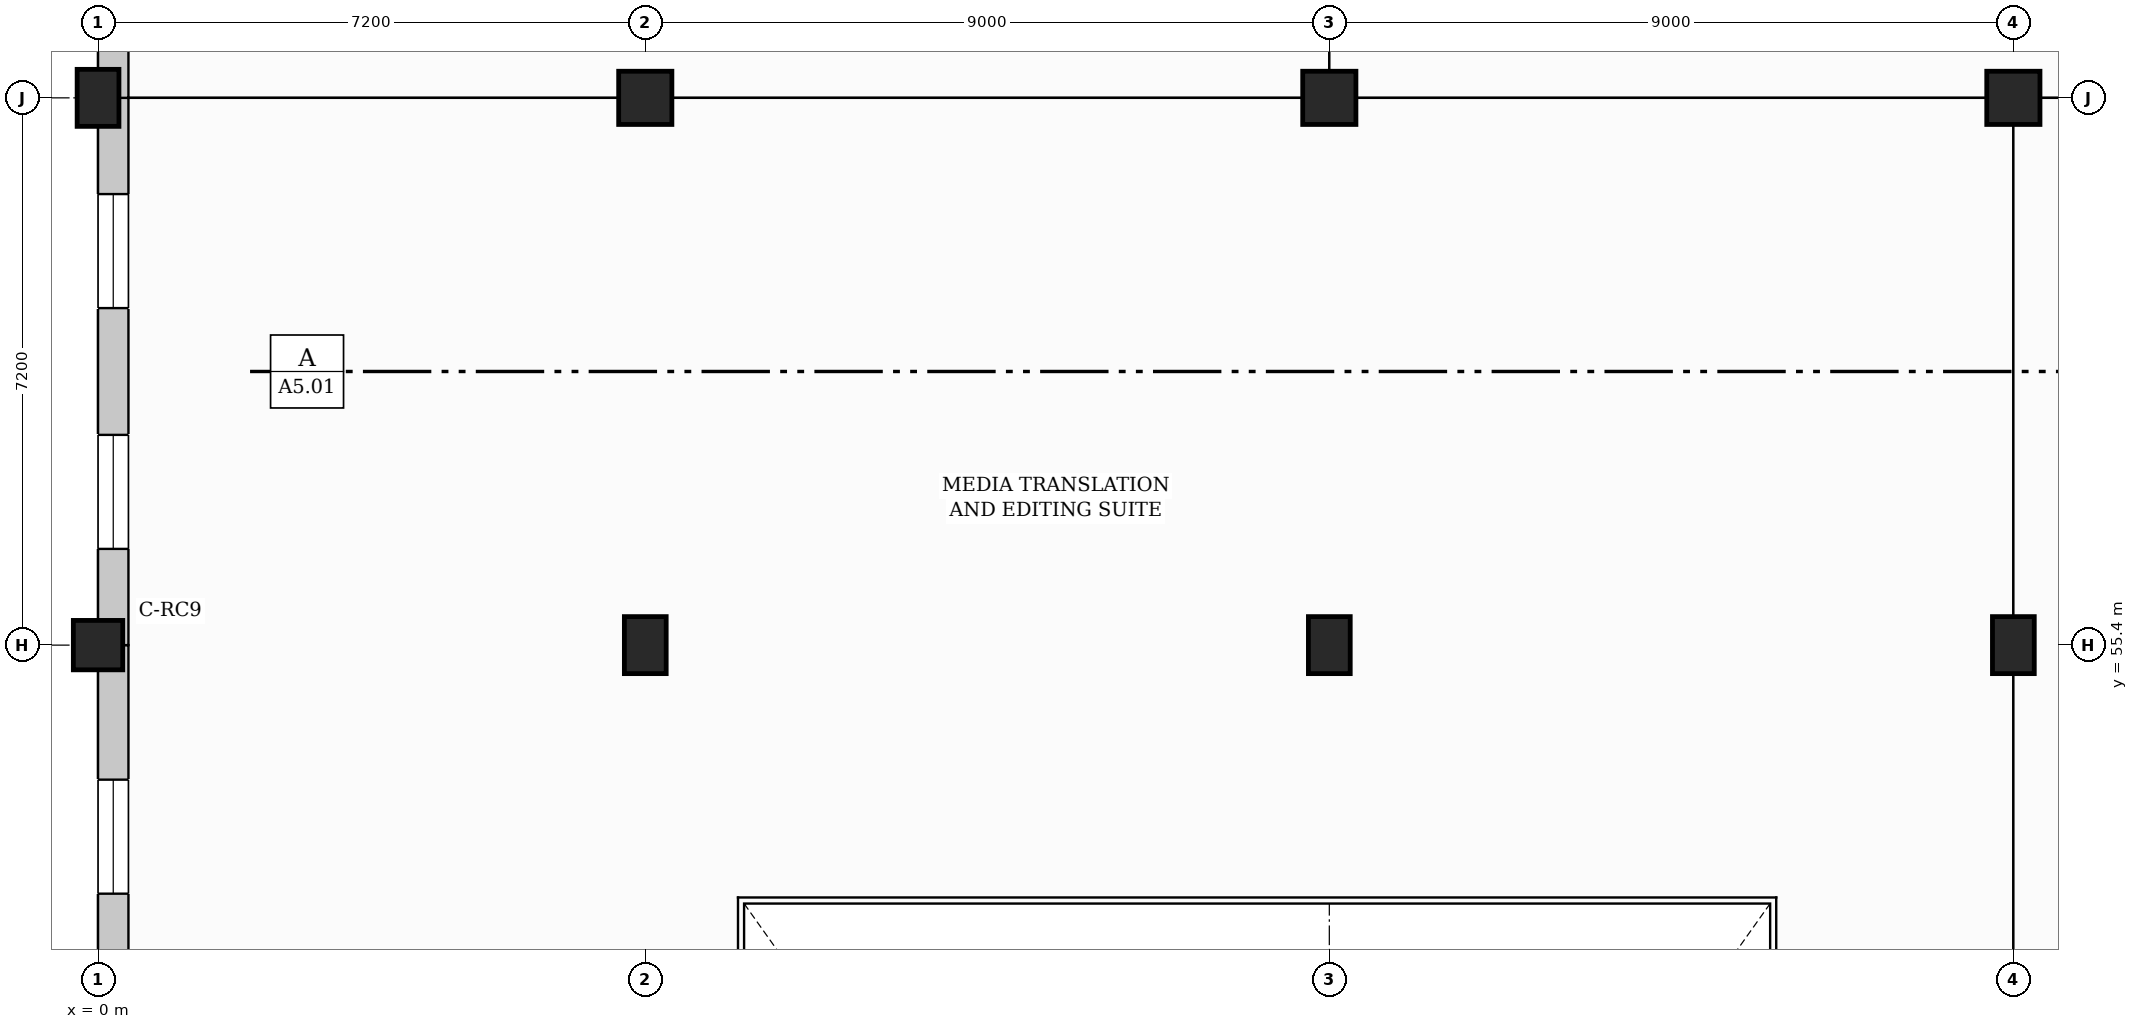
"""IFC4 building model, lengths in metres.
Left out: names, types, materials, properties, quantities, classifications, styles, units other than length and angle.
Written with IfcOpenShell. Run it as: python <this file> out.ifc"""

import sys

from ifc_helpers import new_model, si_unit, direction, frame, frame_2d, origin, origin_2d, place, context, subcontext, project, spatial, rectangle, extrude, element, fill, save


model = new_model("IFC4")
c1 = context("Model", 3, precision=1e-05, world=origin(), true_north=direction((0.0, 1.0)))
c2 = subcontext(c1, "Body", "Model", "MODEL_VIEW")
j1 = project(units=[si_unit("LENGTHUNIT", "METRE"), si_unit("PLANEANGLEUNIT", "RADIAN")], contexts=[c1])
p1 = place(None, origin())
s1 = spatial("IfcSite", under=j1, at=p1, CompositionType="ELEMENT")
p2 = place(p1, origin())
s2 = spatial("IfcBuilding", under=s1, at=p2, CompositionType="ELEMENT")
p3 = place(p2, frame((0.0, 0.0, 5.1)))
s3 = spatial("IfcBuildingStorey", under=s2, at=p3, CompositionType="ELEMENT", Elevation=5.1)
p4 = place(p3, frame((0.0, 55.4, 0.0), z_axis=(0.0, 0.0, 1.0), x_axis=(1.0, 0.0, 0.0)))
e1 = element("IfcColumn", 1, at=p4, inside=s3, PredefinedType="COLUMN", context=c2, shape_type="SweptSolid", body=[
    extrude(rectangle(XDim=0.65, YDim=0.65, at=origin_2d()), origin(), (0.0, 0.0, 1.0), 4.5),
])
for number, where, z_axis, x_axis in (
    (2, (0.0, 62.6, 0.0), (0.0, 0.0, 1.0), (1.0, 0.0, 0.0)),
    (3, (7.2, 55.4, 0.0), (0.0, 0.0, 1.0), (1.0, 0.0, 0.0)),
):
    element("IfcColumn", number, at=place(p3, frame(where, z_axis=z_axis, x_axis=x_axis)), inside=s3, PredefinedType="COLUMN", context=c2, shape_type="SweptSolid", body=[
        extrude(rectangle(XDim=0.55, YDim=0.75, at=origin_2d()), origin(), (0.0, 0.0, 1.0), 4.5),
    ])
p5 = place(p3, frame((7.2, 62.6, 0.0), z_axis=(0.0, 0.0, 1.0), x_axis=(1.0, 0.0, 0.0)))
e4 = element("IfcColumn", 4, at=p5, inside=s3, PredefinedType="COLUMN", context=c2, shape_type="SweptSolid", body=[
    extrude(rectangle(XDim=0.7, YDim=0.7, at=origin_2d()), origin(), (0.0, 0.0, 1.0), 4.5),
])
p6 = place(p3, frame((16.2, 55.4, 0.0), z_axis=(0.0, 0.0, 1.0), x_axis=(1.0, 0.0, 0.0)))
e5 = element("IfcColumn", 5, at=p6, inside=s3, PredefinedType="COLUMN", context=c2, shape_type="SweptSolid", body=[
    extrude(rectangle(XDim=0.55, YDim=0.75, at=origin_2d()), origin(), (0.0, 0.0, 1.0), 4.5),
])
p7 = place(p3, frame((16.2, 62.6, 0.0), z_axis=(0.0, 0.0, 1.0), x_axis=(1.0, 0.0, 0.0)))
e6 = element("IfcColumn", 6, at=p7, inside=s3, PredefinedType="COLUMN", context=c2, shape_type="SweptSolid", body=[
    extrude(rectangle(XDim=0.7, YDim=0.7, at=origin_2d()), origin(), (0.0, 0.0, 1.0), 4.5),
])
p8 = place(p3, frame((25.2, 55.4, 0.0), z_axis=(0.0, 0.0, 1.0), x_axis=(1.0, 0.0, 0.0)))
e7 = element("IfcColumn", 7, at=p8, inside=s3, PredefinedType="COLUMN", context=c2, shape_type="SweptSolid", body=[
    extrude(rectangle(XDim=0.55, YDim=0.75, at=origin_2d()), origin(), (0.0, 0.0, 1.0), 4.5),
])
p9 = place(p3, frame((25.2, 62.6, 0.0), z_axis=(0.0, 0.0, 1.0), x_axis=(1.0, 0.0, 0.0)))
e8 = element("IfcColumn", 8, at=p9, inside=s3, PredefinedType="COLUMN", context=c2, shape_type="SweptSolid", body=[
    extrude(rectangle(XDim=0.7, YDim=0.7, at=origin_2d()), origin(), (0.0, 0.0, 1.0), 4.5),
])
p10 = place(p3, frame((0.2, 46.4, 0.0), z_axis=(0.0, 0.0, 1.0), x_axis=(0.0, 1.0, 0.0)))
e9 = element("IfcWall", 9, at=p10, inside=s3, PredefinedType="SOLIDWALL", context=c2, shape_type="SweptSolid", body=[
    extrude(rectangle(XDim=9.0, YDim=0.4, at=frame_2d((4.5, 0.0))), origin(), (0.0, 0.0, 1.0), 3.42),
])
p11 = place(p10, frame((1.77, 0.0, 0.75)))
e10 = element("IfcOpeningElement", 10, at=p11, cuts=e9, PredefinedType="OPENING", context=c2, shape_type="SweptSolid", body=[
    extrude(rectangle(XDim=1.5, YDim=1.6, at=frame_2d((0.75, 0.8))), frame((0.0, 0.21, 0.0), z_axis=(0.0, -1.0, 0.0), x_axis=(1.0, 0.0, 0.0)), (0.0, 0.0, 1.0), 0.42),
])
p12 = place(p10, frame((5.73, 0.0, 0.75)))
e11 = element("IfcOpeningElement", 11, at=p12, cuts=e9, PredefinedType="OPENING", context=c2, shape_type="SweptSolid", body=[
    extrude(rectangle(XDim=1.5, YDim=1.6, at=frame_2d((0.75, 0.8))), frame((0.0, 0.21, 0.0), z_axis=(0.0, -1.0, 0.0), x_axis=(1.0, 0.0, 0.0)), (0.0, 0.0, 1.0), 0.42),
])
p13 = place(p3, frame((0.2, 55.4, 0.0), z_axis=(0.0, 0.0, 1.0), x_axis=(0.0, 1.0, 0.0)))
e12 = element("IfcWall", 12, at=p13, inside=s3, PredefinedType="SOLIDWALL", context=c2, shape_type="SweptSolid", body=[
    extrude(rectangle(XDim=7.2, YDim=0.4, at=frame_2d((3.6, 0.0))), origin(), (0.0, 0.0, 1.0), 3.42),
])
p14 = place(p13, frame((1.266, 0.0, 0.75)))
e13 = element("IfcOpeningElement", 13, at=p14, cuts=e12, PredefinedType="OPENING", context=c2, shape_type="SweptSolid", body=[
    extrude(rectangle(XDim=1.5, YDim=1.6, at=frame_2d((0.75, 0.8))), frame((0.0, 0.21, 0.0), z_axis=(0.0, -1.0, 0.0), x_axis=(1.0, 0.0, 0.0)), (0.0, 0.0, 1.0), 0.42),
])
p15 = place(p13, frame((4.434, 0.0, 0.75)))
e14 = element("IfcOpeningElement", 14, at=p15, cuts=e12, PredefinedType="OPENING", context=c2, shape_type="SweptSolid", body=[
    extrude(rectangle(XDim=1.5, YDim=1.6, at=frame_2d((0.75, 0.8))), frame((0.0, 0.21, 0.0), z_axis=(0.0, -1.0, 0.0), x_axis=(1.0, 0.0, 0.0)), (0.0, 0.0, 1.0), 0.42),
])
p16 = place(p3, frame((0.2, 62.6, 0.0), z_axis=(0.0, 0.0, 1.0), x_axis=(0.0, 1.0, 0.0)))
e15 = element("IfcWall", 15, at=p16, inside=s3, PredefinedType="SOLIDWALL", context=c2, shape_type="SweptSolid", body=[
    extrude(rectangle(XDim=9.0, YDim=0.4, at=frame_2d((4.5, 0.0))), origin(), (0.0, 0.0, 1.0), 3.54),
])
p17 = place(p16, frame((1.295, 0.0, 0.85)))
e16 = element("IfcOpeningElement", 16, at=p17, cuts=e15, PredefinedType="OPENING", context=c2, shape_type="SweptSolid", body=[
    extrude(rectangle(XDim=2.45, YDim=2.05, at=frame_2d((1.225, 1.025))), frame((0.0, 0.21, 0.0), z_axis=(0.0, -1.0, 0.0), x_axis=(1.0, 0.0, 0.0)), (0.0, 0.0, 1.0), 0.42),
])
p18 = place(p16, frame((5.255, 0.0, 0.85)))
e17 = element("IfcOpeningElement", 17, at=p18, cuts=e15, PredefinedType="OPENING", context=c2, shape_type="SweptSolid", body=[
    extrude(rectangle(XDim=2.45, YDim=2.05, at=frame_2d((1.225, 1.025))), frame((0.0, 0.21, 0.0), z_axis=(0.0, -1.0, 0.0), x_axis=(1.0, 0.0, 0.0)), (0.0, 0.0, 1.0), 0.42),
])
p19 = place(p12, origin())
e18 = element("IfcWindow", 18, at=p19, inside=s3, PartitioningType="DOUBLE_PANEL_HORIZONTAL", PredefinedType="WINDOW", context=c2, shape_type="SweptSolid", body=[
    extrude(rectangle(XDim=1.5, YDim=1.6, at=frame_2d((0.75, 0.8))), frame((0.0, 0.03, 0.0), z_axis=(0.0, -1.0, 0.0), x_axis=(1.0, 0.0, 0.0)), (0.0, 0.0, 1.0), 0.06),
])
fill(e11, e18)
p20 = place(p14, origin())
e19 = element("IfcWindow", 19, at=p20, inside=s3, PartitioningType="DOUBLE_PANEL_HORIZONTAL", PredefinedType="WINDOW", context=c2, shape_type="SweptSolid", body=[
    extrude(rectangle(XDim=1.5, YDim=1.6, at=frame_2d((0.75, 0.8))), frame((0.0, 0.03, 0.0), z_axis=(0.0, -1.0, 0.0), x_axis=(1.0, 0.0, 0.0)), (0.0, 0.0, 1.0), 0.06),
])
fill(e13, e19)
p21 = place(p15, origin())
e20 = element("IfcWindow", 20, at=p21, inside=s3, PartitioningType="DOUBLE_PANEL_HORIZONTAL", PredefinedType="WINDOW", context=c2, shape_type="SweptSolid", body=[
    extrude(rectangle(XDim=1.5, YDim=1.6, at=frame_2d((0.75, 0.8))), frame((0.0, 0.03, 0.0), z_axis=(0.0, -1.0, 0.0), x_axis=(1.0, 0.0, 0.0)), (0.0, 0.0, 1.0), 0.06),
])
fill(e14, e20)
save(model, sys.argv[1])
